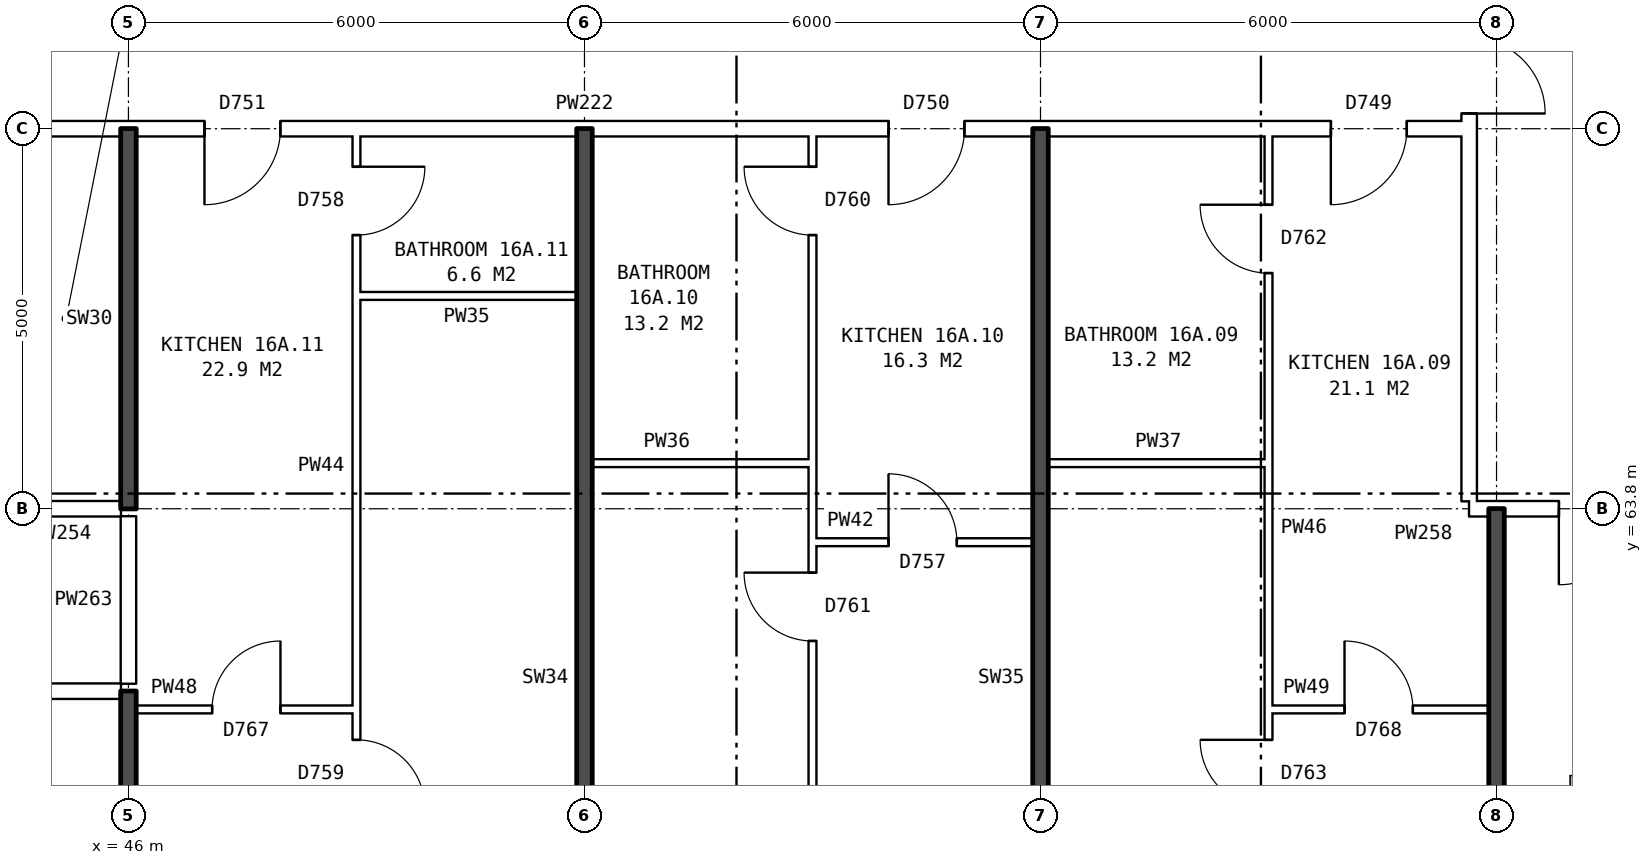
"""IFC4 building model, lengths in metres.
Left out: names, types, materials, properties, quantities, classifications, styles, units other than length and angle.
Written with IfcOpenShell. Run it as: python <this file> out.ifc"""

import sys

from ifc_helpers import new_model, si_unit, direction, frame, frame_2d, origin, place, context, subcontext, project, spatial, rectangle, extrude, element, fill, save


model = new_model("IFC4")
c1 = context("Model", 3, precision=1e-05, world=origin(), true_north=direction((0.0, 1.0)))
c2 = subcontext(c1, "Body", "Model", "MODEL_VIEW")
j1 = project(units=[si_unit("LENGTHUNIT", "METRE"), si_unit("PLANEANGLEUNIT", "RADIAN")], contexts=[c1])
p1 = place(None, origin())
s1 = spatial("IfcSite", under=j1, at=p1, CompositionType="ELEMENT")
p2 = place(p1, origin())
s2 = spatial("IfcBuilding", under=s1, at=p2, CompositionType="ELEMENT")
p3 = place(p2, frame((0.0, 0.0, 59.8)))
s3 = spatial("IfcBuildingStorey", under=s2, at=p3, CompositionType="ELEMENT", Elevation=59.8)
p4 = place(p3, frame((63.64, 63.9, 0.0), z_axis=(0.0, 0.0, 1.0), x_axis=(0.0, 1.0, 0.0)))
e1 = element("IfcWall", 1, at=p4, inside=s3, PredefinedType="PARTITIONING", context=c2, shape_type="SweptSolid", body=[
    extrude(rectangle(XDim=12.2, YDim=0.2, at=frame_2d((6.1, 0.0))), origin(), (0.0, 0.0, 1.0), 2.85),
])
p5 = place(p4, frame((5.1, 0.0, 0.0)))
e2 = element("IfcOpeningElement", 2, at=p5, cuts=e1, PredefinedType="OPENING", context=c2, shape_type="SweptSolid", body=[
    extrude(rectangle(XDim=2.0, YDim=2.1, at=frame_2d((1.0, 1.05))), frame((0.0, 0.11, 0.0), z_axis=(0.0, -1.0, 0.0), x_axis=(1.0, 0.0, 0.0)), (0.0, 0.0, 1.0), 0.22),
])
p6 = place(p3, frame((46.1, 61.16, 0.0), z_axis=(0.0, 0.0, 1.0), x_axis=(1.0, 0.0, 0.0)))
e3 = element("IfcWall", 3, at=p6, inside=s3, PredefinedType="PARTITIONING", context=c2, shape_type="SweptSolid", body=[
    extrude(rectangle(XDim=2.9, YDim=0.1, at=frame_2d((1.45, 0.0))), origin(), (0.0, 0.0, 1.0), 2.85),
])
p7 = place(p6, frame((1.0, 0.0, 0.0)))
e4 = element("IfcOpeningElement", 4, at=p7, cuts=e3, PredefinedType="OPENING", context=c2, shape_type="SweptSolid", body=[
    extrude(rectangle(XDim=0.9, YDim=2.1, at=frame_2d((0.45, 1.05))), frame((0.0, 0.06, 0.0), z_axis=(0.0, -1.0, 0.0), x_axis=(1.0, 0.0, 0.0)), (0.0, 0.0, 1.0), 0.12),
])
p8 = place(p3, frame((61.0, 61.16, 0.0), z_axis=(0.0, 0.0, 1.0), x_axis=(1.0, 0.0, 0.0)))
e5 = element("IfcWall", 5, at=p8, inside=s3, PredefinedType="PARTITIONING", context=c2, shape_type="SweptSolid", body=[
    extrude(rectangle(XDim=2.9, YDim=0.1, at=frame_2d((1.45, 0.0))), origin(), (0.0, 0.0, 1.0), 2.85),
])
p9 = place(p8, frame((1.0, 0.0, 0.0)))
e6 = element("IfcOpeningElement", 6, at=p9, cuts=e5, PredefinedType="OPENING", context=c2, shape_type="SweptSolid", body=[
    extrude(rectangle(XDim=0.9, YDim=2.1, at=frame_2d((0.45, 1.05))), frame((0.0, 0.06, 0.0), z_axis=(0.0, -1.0, 0.0), x_axis=(1.0, 0.0, 0.0)), (0.0, 0.0, 1.0), 0.12),
])
p10 = place(p3, frame((21.86, 61.4, 0.0), z_axis=(0.0, 0.0, 1.0), x_axis=(1.0, 0.0, 0.0)))
e7 = element("IfcWall", 7, at=p10, inside=s3, PredefinedType="PARTITIONING", context=c2, shape_type="SweptSolid", body=[
    extrude(rectangle(XDim=24.04, YDim=0.2, at=frame_2d((12.02, 0.0))), origin(), (0.0, 0.0, 1.0), 2.85),
])
p11 = place(p10, frame((19.44, 0.0, 0.0)))
e8 = element("IfcOpeningElement", 8, at=p11, cuts=e7, PredefinedType="OPENING", context=c2, shape_type="SweptSolid", body=[
    extrude(rectangle(XDim=1.0, YDim=2.1, at=frame_2d((0.5, 1.05))), frame((0.0, 0.11, 0.0), z_axis=(0.0, -1.0, 0.0), x_axis=(1.0, 0.0, 0.0)), (0.0, 0.0, 1.0), 0.22),
])
p12 = place(p10, frame((14.64, 0.0, 0.0)))
e9 = element("IfcOpeningElement", 9, at=p12, cuts=e7, PredefinedType="OPENING", context=c2, shape_type="SweptSolid", body=[
    extrude(rectangle(XDim=1.0, YDim=2.1, at=frame_2d((0.5, 1.05))), frame((0.0, 0.11, 0.0), z_axis=(0.0, -1.0, 0.0), x_axis=(1.0, 0.0, 0.0)), (0.0, 0.0, 1.0), 0.22),
])
p13 = place(p10, frame((2.57, 0.0, 0.0)))
e10 = element("IfcOpeningElement", 10, at=p13, cuts=e7, PredefinedType="OPENING", context=c2, shape_type="SweptSolid", body=[
    extrude(rectangle(XDim=1.0, YDim=2.1, at=frame_2d((0.5, 1.05))), frame((0.0, 0.11, 0.0), z_axis=(0.0, -1.0, 0.0), x_axis=(1.0, 0.0, 0.0)), (0.0, 0.0, 1.0), 0.22),
])
p14 = place(p3, frame((55.0, 63.36, 0.0), z_axis=(0.0, 0.0, 1.0), x_axis=(1.0, 0.0, 0.0)))
e11 = element("IfcWall", 11, at=p14, inside=s3, PredefinedType="PARTITIONING", context=c2, shape_type="SweptSolid", body=[
    extrude(rectangle(XDim=2.9, YDim=0.1, at=frame_2d((1.45, 0.0))), origin(), (0.0, 0.0, 1.0), 2.85),
])
p15 = place(p14, frame((1.0, 0.0, 0.0)))
e12 = element("IfcOpeningElement", 12, at=p15, cuts=e11, PredefinedType="OPENING", context=c2, shape_type="SweptSolid", body=[
    extrude(rectangle(XDim=0.9, YDim=2.1, at=frame_2d((0.45, 1.05))), frame((0.0, 0.06, 0.0), z_axis=(0.0, -1.0, 0.0), x_axis=(1.0, 0.0, 0.0)), (0.0, 0.0, 1.0), 0.12),
])
p16 = place(p3, frame((44.36, 63.8, 0.0), z_axis=(0.0, 0.0, 1.0), x_axis=(1.0, 0.0, 0.0)))
e13 = element("IfcWall", 13, at=p16, inside=s3, PredefinedType="PARTITIONING", context=c2, shape_type="SweptSolid", body=[
    extrude(rectangle(XDim=1.54, YDim=0.2, at=frame_2d((0.77, 0.0))), origin(), (0.0, 0.0, 1.0), 2.85),
])
p17 = place(p3, frame((63.64, 63.8, 0.0), z_axis=(0.0, 0.0, 1.0), x_axis=(1.0, 0.0, 0.0)))
e14 = element("IfcWall", 14, at=p17, inside=s3, PredefinedType="PARTITIONING", context=c2, shape_type="SweptSolid", body=[
    extrude(rectangle(XDim=3.0, YDim=0.2, at=frame_2d((1.5, 0.0))), origin(), (0.0, 0.0, 1.0), 2.85),
])
p18 = place(p17, frame((1.18, 0.0, 0.0)))
e15 = element("IfcOpeningElement", 15, at=p18, cuts=e14, PredefinedType="OPENING", context=c2, shape_type="SweptSolid", body=[
    extrude(rectangle(XDim=1.0, YDim=2.1, at=frame_2d((0.5, 1.05))), frame((0.0, 0.11, 0.0), z_axis=(0.0, -1.0, 0.0), x_axis=(1.0, 0.0, 0.0)), (0.0, 0.0, 1.0), 0.22),
])
for number, where, z_axis, x_axis in (
    (16, (52.1, 64.4, 0.0), (0.0, 0.0, 1.0), (1.0, 0.0, 0.0)),
    (17, (58.1, 64.4, 0.0), (0.0, 0.0, 1.0), (1.0, 0.0, 0.0)),
    (18, (49.0, 66.6, 0.0), (0.0, 0.0, 1.0), (1.0, 0.0, 0.0)),
):
    element("IfcWall", number, at=place(p3, frame(where, z_axis=z_axis, x_axis=x_axis)), inside=s3, PredefinedType="PARTITIONING", context=c2, shape_type="SweptSolid", body=[
        extrude(rectangle(XDim=2.9, YDim=0.1, at=frame_2d((1.45, 0.0))), origin(), (0.0, 0.0, 1.0), 2.85),
    ])
p19 = place(p3, frame((44.36, 68.8, 0.0), z_axis=(0.0, 0.0, 1.0), x_axis=(1.0, 0.0, 0.0)))
e19 = element("IfcWall", 19, at=p19, inside=s3, PredefinedType="PARTITIONING", context=c2, shape_type="SweptSolid", body=[
    extrude(rectangle(XDim=19.28, YDim=0.2, at=frame_2d((9.64, 0.0))), origin(), (0.0, 0.0, 1.0), 2.85),
])
p20 = place(p19, frame((17.46, 0.0, 0.0)))
e20 = element("IfcOpeningElement", 20, at=p20, cuts=e19, PredefinedType="OPENING", context=c2, shape_type="SweptSolid", body=[
    extrude(rectangle(XDim=1.0, YDim=2.1, at=frame_2d((0.5, 1.05))), frame((0.0, 0.11, 0.0), z_axis=(0.0, -1.0, 0.0), x_axis=(1.0, 0.0, 0.0)), (0.0, 0.0, 1.0), 0.22),
])
p21 = place(p19, frame((11.64, 0.0, 0.0)))
e21 = element("IfcOpeningElement", 21, at=p21, cuts=e19, PredefinedType="OPENING", context=c2, shape_type="SweptSolid", body=[
    extrude(rectangle(XDim=1.0, YDim=2.1, at=frame_2d((0.5, 1.05))), frame((0.0, 0.11, 0.0), z_axis=(0.0, -1.0, 0.0), x_axis=(1.0, 0.0, 0.0)), (0.0, 0.0, 1.0), 0.22),
])
p22 = place(p19, frame((2.64, 0.0, 0.0)))
e22 = element("IfcOpeningElement", 22, at=p22, cuts=e19, PredefinedType="OPENING", context=c2, shape_type="SweptSolid", body=[
    extrude(rectangle(XDim=1.0, YDim=2.1, at=frame_2d((0.5, 1.05))), frame((0.0, 0.11, 0.0), z_axis=(0.0, -1.0, 0.0), x_axis=(1.0, 0.0, 0.0)), (0.0, 0.0, 1.0), 0.22),
])
p23 = place(p3, frame((46.0, 54.36, 0.0), z_axis=(0.0, 0.0, 1.0), x_axis=(0.0, 1.0, 0.0)))
e23 = element("IfcWall", 23, at=p23, inside=s3, PredefinedType="SOLIDWALL", context=c2, shape_type="SweptSolid", body=[
    extrude(rectangle(XDim=7.04, YDim=0.2, at=frame_2d((3.52, 0.0))), origin(), (0.0, 0.0, 1.0), 2.85),
])
p24 = place(p3, frame((46.0, 61.5, 0.0), z_axis=(0.0, 0.0, 1.0), x_axis=(0.0, 1.0, 0.0)))
e24 = element("IfcWall", 24, at=p24, inside=s3, PredefinedType="PARTITIONING", context=c2, shape_type="SweptSolid", body=[
    extrude(rectangle(XDim=2.2, YDim=0.2, at=frame_2d((1.1, 0.0))), origin(), (0.0, 0.0, 1.0), 2.85),
])
p25 = place(p3, frame((46.0, 63.8, 0.0), z_axis=(0.0, 0.0, 1.0), x_axis=(0.0, 1.0, 0.0)))
e25 = element("IfcWall", 25, at=p25, inside=s3, PredefinedType="SOLIDWALL", context=c2, shape_type="SweptSolid", body=[
    extrude(rectangle(XDim=5.0, YDim=0.2, at=frame_2d((2.5, 0.0))), origin(), (0.0, 0.0, 1.0), 2.85),
])
p26 = place(p3, frame((49.0, 54.36, 0.0), z_axis=(0.0, 0.0, 1.0), x_axis=(0.0, 1.0, 0.0)))
e26 = element("IfcWall", 26, at=p26, inside=s3, PredefinedType="PARTITIONING", context=c2, shape_type="SweptSolid", body=[
    extrude(rectangle(XDim=14.34, YDim=0.1, at=frame_2d((7.17, 0.0))), origin(), (0.0, 0.0, 1.0), 2.85),
])
p27 = place(p26, frame((5.5, 0.0, 0.0)))
e27 = element("IfcOpeningElement", 27, at=p27, cuts=e26, PredefinedType="OPENING", context=c2, shape_type="SweptSolid", body=[
    extrude(rectangle(XDim=0.9, YDim=2.1, at=frame_2d((0.45, 1.05))), frame((0.0, 0.06, 0.0), z_axis=(0.0, -1.0, 0.0), x_axis=(1.0, 0.0, 0.0)), (0.0, 0.0, 1.0), 0.12),
])
p28 = place(p26, frame((13.04, 0.0, 0.0)))
e28 = element("IfcOpeningElement", 28, at=p28, cuts=e26, PredefinedType="OPENING", context=c2, shape_type="SweptSolid", body=[
    extrude(rectangle(XDim=0.9, YDim=2.1, at=frame_2d((0.45, 1.05))), frame((0.0, 0.06, 0.0), z_axis=(0.0, -1.0, 0.0), x_axis=(1.0, 0.0, 0.0)), (0.0, 0.0, 1.0), 0.12),
])
p29 = place(p3, frame((52.0, 54.36, 0.0), z_axis=(0.0, 0.0, 1.0), x_axis=(0.0, 1.0, 0.0)))
e29 = element("IfcWall", 29, at=p29, inside=s3, PredefinedType="SOLIDWALL", context=c2, shape_type="SweptSolid", body=[
    extrude(rectangle(XDim=14.44, YDim=0.2, at=frame_2d((7.22, 0.0))), origin(), (0.0, 0.0, 1.0), 2.85),
])
p30 = place(p3, frame((55.0, 54.36, 0.0), z_axis=(0.0, 0.0, 1.0), x_axis=(0.0, 1.0, 0.0)))
e30 = element("IfcWall", 30, at=p30, inside=s3, PredefinedType="PARTITIONING", context=c2, shape_type="SweptSolid", body=[
    extrude(rectangle(XDim=14.34, YDim=0.1, at=frame_2d((7.17, 0.0))), origin(), (0.0, 0.0, 1.0), 2.85),
])
p31 = place(p30, frame((7.7, 0.0, 0.0)))
e31 = element("IfcOpeningElement", 31, at=p31, cuts=e30, PredefinedType="OPENING", context=c2, shape_type="SweptSolid", body=[
    extrude(rectangle(XDim=0.9, YDim=2.1, at=frame_2d((0.45, 1.05))), frame((0.0, 0.06, 0.0), z_axis=(0.0, -1.0, 0.0), x_axis=(1.0, 0.0, 0.0)), (0.0, 0.0, 1.0), 0.12),
])
p32 = place(p30, frame((13.04, 0.0, 0.0)))
e32 = element("IfcOpeningElement", 32, at=p32, cuts=e30, PredefinedType="OPENING", context=c2, shape_type="SweptSolid", body=[
    extrude(rectangle(XDim=0.9, YDim=2.1, at=frame_2d((0.45, 1.05))), frame((0.0, 0.06, 0.0), z_axis=(0.0, -1.0, 0.0), x_axis=(1.0, 0.0, 0.0)), (0.0, 0.0, 1.0), 0.12),
])
p33 = place(p3, frame((58.0, 54.36, 0.0), z_axis=(0.0, 0.0, 1.0), x_axis=(0.0, 1.0, 0.0)))
e33 = element("IfcWall", 33, at=p33, inside=s3, PredefinedType="SOLIDWALL", context=c2, shape_type="SweptSolid", body=[
    extrude(rectangle(XDim=14.44, YDim=0.2, at=frame_2d((7.22, 0.0))), origin(), (0.0, 0.0, 1.0), 2.85),
])
p34 = place(p3, frame((61.0, 54.36, 0.0), z_axis=(0.0, 0.0, 1.0), x_axis=(0.0, 1.0, 0.0)))
e34 = element("IfcWall", 34, at=p34, inside=s3, PredefinedType="PARTITIONING", context=c2, shape_type="SweptSolid", body=[
    extrude(rectangle(XDim=14.34, YDim=0.1, at=frame_2d((7.17, 0.0))), origin(), (0.0, 0.0, 1.0), 2.85),
])
p35 = place(p34, frame((5.5, 0.0, 0.0)))
e35 = element("IfcOpeningElement", 35, at=p35, cuts=e34, PredefinedType="OPENING", context=c2, shape_type="SweptSolid", body=[
    extrude(rectangle(XDim=0.9, YDim=2.1, at=frame_2d((0.45, 1.05))), frame((0.0, 0.06, 0.0), z_axis=(0.0, -1.0, 0.0), x_axis=(1.0, 0.0, 0.0)), (0.0, 0.0, 1.0), 0.12),
])
p36 = place(p34, frame((12.54, 0.0, 0.0)))
e36 = element("IfcOpeningElement", 36, at=p36, cuts=e34, PredefinedType="OPENING", context=c2, shape_type="SweptSolid", body=[
    extrude(rectangle(XDim=0.9, YDim=2.1, at=frame_2d((0.45, 1.05))), frame((0.0, 0.06, 0.0), z_axis=(0.0, -1.0, 0.0), x_axis=(1.0, 0.0, 0.0)), (0.0, 0.0, 1.0), 0.12),
])
p37 = place(p3, frame((64.0, 54.36, 0.0), z_axis=(0.0, 0.0, 1.0), x_axis=(0.0, 1.0, 0.0)))
e37 = element("IfcWall", 37, at=p37, inside=s3, PredefinedType="SOLIDWALL", context=c2, shape_type="SweptSolid", body=[
    extrude(rectangle(XDim=9.44, YDim=0.2, at=frame_2d((4.72, 0.0))), origin(), (0.0, 0.0, 1.0), 2.85),
])
p38 = place(p5, frame((2.0, 0.0, 0.0), z_axis=(0.0, 0.0, 1.0), x_axis=(-1.0, 0.0, 0.0)))
e38 = element("IfcDoor", 38, at=p38, inside=s3, OperationType="DOUBLE_DOOR_SINGLE_SWING", PredefinedType="DOOR", context=c2, shape_type="SweptSolid", body=[
    extrude(rectangle(XDim=2.0, YDim=2.1, at=frame_2d((1.0, 1.05))), frame((0.0, 0.025, 0.0), z_axis=(0.0, -1.0, 0.0), x_axis=(1.0, 0.0, 0.0)), (0.0, 0.0, 1.0), 0.05),
])
fill(e2, e38)
p39 = place(p18, frame((1.0, 0.0, 0.0), z_axis=(0.0, 0.0, 1.0), x_axis=(-1.0, 0.0, 0.0)))
e39 = element("IfcDoor", 39, at=p39, inside=s3, OperationType="SINGLE_SWING_RIGHT", PredefinedType="DOOR", context=c2, shape_type="SweptSolid", body=[
    extrude(rectangle(XDim=1.0, YDim=2.1, at=frame_2d((0.5, 1.05))), frame((0.0, 0.025, 0.0), z_axis=(0.0, -1.0, 0.0), x_axis=(1.0, 0.0, 0.0)), (0.0, 0.0, 1.0), 0.05),
])
fill(e15, e39)
p40 = place(p35, origin())
e40 = element("IfcDoor", 40, at=p40, inside=s3, OperationType="SINGLE_SWING_RIGHT", PredefinedType="DOOR", context=c2, shape_type="SweptSolid", body=[
    extrude(rectangle(XDim=0.9, YDim=2.1, at=frame_2d((0.45, 1.05))), frame((0.0, 0.025, 0.0), z_axis=(0.0, -1.0, 0.0), x_axis=(1.0, 0.0, 0.0)), (0.0, 0.0, 1.0), 0.05),
])
fill(e35, e40)
p41 = place(p20, frame((1.0, 0.0, 0.0), z_axis=(0.0, 0.0, 1.0), x_axis=(-1.0, 0.0, 0.0)))
e41 = element("IfcDoor", 41, at=p41, inside=s3, OperationType="SINGLE_SWING_RIGHT", PredefinedType="DOOR", context=c2, shape_type="SweptSolid", body=[
    extrude(rectangle(XDim=1.0, YDim=2.1, at=frame_2d((0.5, 1.05))), frame((0.0, 0.025, 0.0), z_axis=(0.0, -1.0, 0.0), x_axis=(1.0, 0.0, 0.0)), (0.0, 0.0, 1.0), 0.05),
])
fill(e20, e41)
p42 = place(p9, origin())
e42 = element("IfcDoor", 42, at=p42, inside=s3, OperationType="SINGLE_SWING_LEFT", PredefinedType="DOOR", context=c2, shape_type="SweptSolid", body=[
    extrude(rectangle(XDim=0.9, YDim=2.1, at=frame_2d((0.45, 1.05))), frame((0.0, 0.025, 0.0), z_axis=(0.0, -1.0, 0.0), x_axis=(1.0, 0.0, 0.0)), (0.0, 0.0, 1.0), 0.05),
])
fill(e6, e42)
p43 = place(p36, origin())
e43 = element("IfcDoor", 43, at=p43, inside=s3, OperationType="SINGLE_SWING_RIGHT", PredefinedType="DOOR", context=c2, shape_type="SweptSolid", body=[
    extrude(rectangle(XDim=0.9, YDim=2.1, at=frame_2d((0.45, 1.05))), frame((0.0, 0.025, 0.0), z_axis=(0.0, -1.0, 0.0), x_axis=(1.0, 0.0, 0.0)), (0.0, 0.0, 1.0), 0.05),
])
fill(e36, e43)
p44 = place(p31, origin())
e44 = element("IfcDoor", 44, at=p44, inside=s3, OperationType="SINGLE_SWING_RIGHT", PredefinedType="DOOR", context=c2, shape_type="SweptSolid", body=[
    extrude(rectangle(XDim=0.9, YDim=2.1, at=frame_2d((0.45, 1.05))), frame((0.0, 0.025, 0.0), z_axis=(0.0, -1.0, 0.0), x_axis=(1.0, 0.0, 0.0)), (0.0, 0.0, 1.0), 0.05),
])
fill(e31, e44)
p45 = place(p21, frame((1.0, 0.0, 0.0), z_axis=(0.0, 0.0, 1.0), x_axis=(-1.0, 0.0, 0.0)))
e45 = element("IfcDoor", 45, at=p45, inside=s3, OperationType="SINGLE_SWING_RIGHT", PredefinedType="DOOR", context=c2, shape_type="SweptSolid", body=[
    extrude(rectangle(XDim=1.0, YDim=2.1, at=frame_2d((0.5, 1.05))), frame((0.0, 0.025, 0.0), z_axis=(0.0, -1.0, 0.0), x_axis=(1.0, 0.0, 0.0)), (0.0, 0.0, 1.0), 0.05),
])
fill(e21, e45)
p46 = place(p15, origin())
e46 = element("IfcDoor", 46, at=p46, inside=s3, OperationType="SINGLE_SWING_LEFT", PredefinedType="DOOR", context=c2, shape_type="SweptSolid", body=[
    extrude(rectangle(XDim=0.9, YDim=2.1, at=frame_2d((0.45, 1.05))), frame((0.0, 0.025, 0.0), z_axis=(0.0, -1.0, 0.0), x_axis=(1.0, 0.0, 0.0)), (0.0, 0.0, 1.0), 0.05),
])
fill(e12, e46)
p47 = place(p32, origin())
e47 = element("IfcDoor", 47, at=p47, inside=s3, OperationType="SINGLE_SWING_RIGHT", PredefinedType="DOOR", context=c2, shape_type="SweptSolid", body=[
    extrude(rectangle(XDim=0.9, YDim=2.1, at=frame_2d((0.45, 1.05))), frame((0.0, 0.025, 0.0), z_axis=(0.0, -1.0, 0.0), x_axis=(1.0, 0.0, 0.0)), (0.0, 0.0, 1.0), 0.05),
])
fill(e32, e47)
p48 = place(p27, frame((0.9, 0.0, 0.0), z_axis=(0.0, 0.0, 1.0), x_axis=(-1.0, 0.0, 0.0)))
e48 = element("IfcDoor", 48, at=p48, inside=s3, OperationType="SINGLE_SWING_RIGHT", PredefinedType="DOOR", context=c2, shape_type="SweptSolid", body=[
    extrude(rectangle(XDim=0.9, YDim=2.1, at=frame_2d((0.45, 1.05))), frame((0.0, 0.025, 0.0), z_axis=(0.0, -1.0, 0.0), x_axis=(1.0, 0.0, 0.0)), (0.0, 0.0, 1.0), 0.05),
])
fill(e27, e48)
p49 = place(p22, frame((1.0, 0.0, 0.0), z_axis=(0.0, 0.0, 1.0), x_axis=(-1.0, 0.0, 0.0)))
e49 = element("IfcDoor", 49, at=p49, inside=s3, OperationType="SINGLE_SWING_RIGHT", PredefinedType="DOOR", context=c2, shape_type="SweptSolid", body=[
    extrude(rectangle(XDim=1.0, YDim=2.1, at=frame_2d((0.5, 1.05))), frame((0.0, 0.025, 0.0), z_axis=(0.0, -1.0, 0.0), x_axis=(1.0, 0.0, 0.0)), (0.0, 0.0, 1.0), 0.05),
])
fill(e22, e49)
p50 = place(p7, origin())
e50 = element("IfcDoor", 50, at=p50, inside=s3, OperationType="SINGLE_SWING_RIGHT", PredefinedType="DOOR", context=c2, shape_type="SweptSolid", body=[
    extrude(rectangle(XDim=0.9, YDim=2.1, at=frame_2d((0.45, 1.05))), frame((0.0, 0.025, 0.0), z_axis=(0.0, -1.0, 0.0), x_axis=(1.0, 0.0, 0.0)), (0.0, 0.0, 1.0), 0.05),
])
fill(e4, e50)
p51 = place(p28, frame((0.9, 0.0, 0.0), z_axis=(0.0, 0.0, 1.0), x_axis=(-1.0, 0.0, 0.0)))
e51 = element("IfcDoor", 51, at=p51, inside=s3, OperationType="SINGLE_SWING_LEFT", PredefinedType="DOOR", context=c2, shape_type="SweptSolid", body=[
    extrude(rectangle(XDim=0.9, YDim=2.1, at=frame_2d((0.45, 1.05))), frame((0.0, 0.025, 0.0), z_axis=(0.0, -1.0, 0.0), x_axis=(1.0, 0.0, 0.0)), (0.0, 0.0, 1.0), 0.05),
])
fill(e28, e51)
save(model, sys.argv[1])
